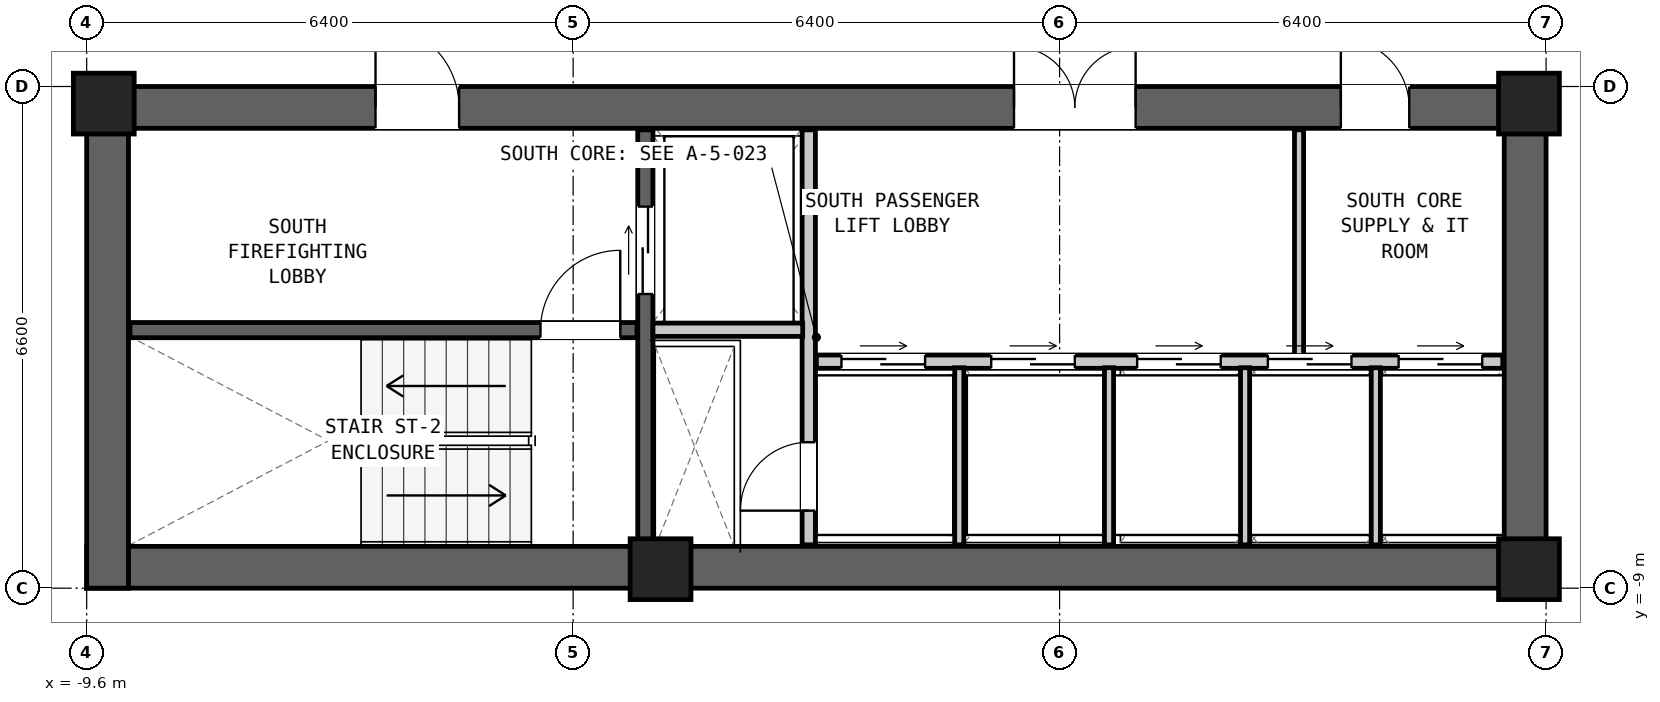
"""IFC4 building model, lengths in metres.
Left out: names, types, materials, properties, quantities, classifications, styles, units other than length and angle.
Written with IfcOpenShell. Run it as: python <this file> out.ifc"""

import sys

from ifc_helpers import new_model, si_unit, direction, frame, frame_2d, origin, origin_2d, place, context, subcontext, project, spatial, rectangle, extrude, element, fill, save


model = new_model("IFC4")
c1 = context("Model", 3, precision=1e-05, world=origin(), true_north=direction((0.0, 1.0)))
c2 = subcontext(c1, "Body", "Model", "MODEL_VIEW")
j1 = project(units=[si_unit("LENGTHUNIT", "METRE"), si_unit("PLANEANGLEUNIT", "RADIAN")], contexts=[c1])
p1 = place(None, origin())
s1 = spatial("IfcSite", under=j1, at=p1, CompositionType="ELEMENT")
p2 = place(p1, origin())
s2 = spatial("IfcBuilding", under=s1, at=p2, CompositionType="ELEMENT")
p3 = place(p2, frame((0.0, 0.0, 72.5)))
s3 = spatial("IfcBuildingStorey", under=s2, at=p3, CompositionType="ELEMENT", Elevation=72.5)
p4 = place(p3, frame((-9.6, -8.725, 0.0), z_axis=(0.0, 0.0, 1.0), x_axis=(1.0, 0.0, 0.0)))
e1 = element("IfcWall", 1, at=p4, inside=s3, PredefinedType="SHEAR", context=c2, shape_type="SweptSolid", body=[
    extrude(rectangle(XDim=19.2, YDim=0.55, at=frame_2d((9.6, 0.0))), origin(), (0.0, 0.0, 1.0), 3.05),
])
p5 = place(p3, frame((-9.6, -2.675, 0.0), z_axis=(0.0, 0.0, 1.0), x_axis=(1.0, 0.0, 0.0)))
e2 = element("IfcWall", 2, at=p5, inside=s3, PredefinedType="SHEAR", context=c2, shape_type="SweptSolid", body=[
    extrude(rectangle(XDim=19.2, YDim=0.55, at=frame_2d((9.6, 0.0))), origin(), (0.0, 0.0, 1.0), 3.05),
])
p6 = place(p5, frame((3.8, 0.0, 0.0)))
e3 = element("IfcOpeningElement", 3, at=p6, cuts=e2, PredefinedType="OPENING", context=c2, shape_type="SweptSolid", body=[
    extrude(rectangle(XDim=1.1, YDim=2.08, at=frame_2d((0.55, 1.04))), frame((0.0, 0.287, 0.0), z_axis=(0.0, -1.0, 0.0), x_axis=(1.0, 0.0, 0.0)), (0.0, 0.0, 1.0), 0.574),
])
p7 = place(p5, frame((12.2, 0.0, 0.0)))
e4 = element("IfcOpeningElement", 4, at=p7, cuts=e2, PredefinedType="OPENING", context=c2, shape_type="SweptSolid", body=[
    extrude(rectangle(XDim=1.6, YDim=2.12, at=frame_2d((0.8, 1.06))), frame((0.0, 0.287, 0.0), z_axis=(0.0, -1.0, 0.0), x_axis=(1.0, 0.0, 0.0)), (0.0, 0.0, 1.0), 0.574),
])
p8 = place(p5, frame((16.5, 0.0, 0.0)))
e5 = element("IfcOpeningElement", 5, at=p8, cuts=e2, PredefinedType="OPENING", context=c2, shape_type="SweptSolid", body=[
    extrude(rectangle(XDim=0.9, YDim=2.05, at=frame_2d((0.45, 1.025))), frame((0.0, 0.287, 0.0), z_axis=(0.0, -1.0, 0.0), x_axis=(1.0, 0.0, 0.0)), (0.0, 0.0, 1.0), 0.574),
])
for number, where, z_axis, x_axis in (
    (6, (-9.325, -9.0, 0.0), (0.0, 0.0, 1.0), (0.0, 1.0, 0.0)),
    (7, (9.325, -9.0, 0.0), (0.0, 0.0, 1.0), (0.0, 1.0, 0.0)),
):
    element("IfcWall", number, at=place(p3, frame(where, z_axis=z_axis, x_axis=x_axis)), inside=s3, PredefinedType="SHEAR", context=c2, shape_type="SweptSolid", body=[
        extrude(rectangle(XDim=6.6, YDim=0.55, at=frame_2d((3.3, 0.0))), origin(), (0.0, 0.0, 1.0), 3.05),
    ])
for number, where, z_axis, x_axis in (
    (8, (-9.375, -2.625, 0.0), (0.0, 0.0, 1.0), (1.0, 0.0, 0.0)),
    (9, (9.375, -2.625, 0.0), (0.0, 0.0, 1.0), (1.0, 0.0, 0.0)),
    (10, (-2.05, -8.75, 0.0), (0.0, 0.0, 1.0), (1.0, 0.0, 0.0)),
    (11, (9.375, -8.75, 0.0), (0.0, 0.0, 1.0), (1.0, 0.0, 0.0)),
):
    element("IfcColumn", number, at=place(p3, frame(where, z_axis=z_axis, x_axis=x_axis)), inside=s3, PredefinedType="COLUMN", context=c2, shape_type="SweptSolid", body=[
        extrude(rectangle(XDim=0.8, YDim=0.8, at=origin_2d()), origin(), (0.0, 0.0, 1.0), 3.05),
    ])
p9 = place(p3, frame((-9.03, -5.605, 0.0), z_axis=(0.0, 0.0, 1.0), x_axis=(1.0, 0.0, 0.0)))
e12 = element("IfcWall", 12, at=p9, inside=s3, PredefinedType="SHEAR", context=c2, shape_type="SweptSolid", body=[
    extrude(rectangle(XDim=6.67, YDim=0.2, at=frame_2d((3.335, 0.0))), origin(), (0.0, 0.0, 1.0), 2.83),
])
p10 = place(p9, frame((5.4, 0.0, 0.0)))
e13 = element("IfcOpeningElement", 13, at=p10, cuts=e12, PredefinedType="OPENING", context=c2, shape_type="SweptSolid", body=[
    extrude(rectangle(XDim=1.05, YDim=2.08, at=frame_2d((0.525, 1.04))), frame((0.0, 0.112, 0.0), z_axis=(0.0, -1.0, 0.0), x_axis=(1.0, 0.0, 0.0)), (0.0, 0.0, 1.0), 0.224),
])
p11 = place(p3, frame((-2.25, -8.43, 0.0), z_axis=(0.0, 0.0, 1.0), x_axis=(0.0, 1.0, 0.0)))
e14 = element("IfcWall", 14, at=p11, inside=s3, PredefinedType="SHEAR", context=c2, shape_type="SweptSolid", body=[
    extrude(rectangle(XDim=5.46, YDim=0.2, at=frame_2d((2.73, 0.0))), origin(), (0.0, 0.0, 1.0), 2.83),
])
p12 = place(p11, frame((3.3, 0.0, 0.0)))
e15 = element("IfcOpeningElement", 15, at=p12, cuts=e14, PredefinedType="OPENING", context=c2, shape_type="SweptSolid", body=[
    extrude(rectangle(XDim=1.15, YDim=2.08, at=frame_2d((0.575, 1.04))), frame((0.0, 0.112, 0.0), z_axis=(0.0, -1.0, 0.0), x_axis=(1.0, 0.0, 0.0)), (0.0, 0.0, 1.0), 0.224),
])
p13 = place(p3, frame((-0.1, -8.43, 0.0), z_axis=(0.0, 0.0, 1.0), x_axis=(0.0, 1.0, 0.0)))
e16 = element("IfcWall", 16, at=p13, inside=s3, PredefinedType="PARTITIONING", context=c2, shape_type="SweptSolid", body=[
    extrude(rectangle(XDim=5.46, YDim=0.175, at=frame_2d((2.73, 0.0))), origin(), (0.0, 0.0, 1.0), 2.83),
])
p14 = place(p13, frame((0.45, 0.0, 0.0)))
e17 = element("IfcOpeningElement", 17, at=p14, cuts=e16, PredefinedType="OPENING", context=c2, shape_type="SweptSolid", body=[
    extrude(rectangle(XDim=0.9, YDim=2.05, at=frame_2d((0.45, 1.025))), frame((0.0, 0.1, 0.0), z_axis=(0.0, -1.0, 0.0), x_axis=(1.0, 0.0, 0.0)), (0.0, 0.0, 1.0), 0.199),
])
p15 = place(p3, frame((-2.15, -5.6, 0.0), z_axis=(0.0, 0.0, 1.0), x_axis=(1.0, 0.0, 0.0)))
e18 = element("IfcWall", 18, at=p15, inside=s3, PredefinedType="PARTITIONING", context=c2, shape_type="SweptSolid", body=[
    extrude(rectangle(XDim=1.97, YDim=0.175, at=frame_2d((0.985, 0.0))), origin(), (0.0, 0.0, 1.0), 2.83),
])
p16 = place(p3, frame((0.0, -6.02, 0.0), z_axis=(0.0, 0.0, 1.0), x_axis=(1.0, 0.0, 0.0)))
e19 = element("IfcWall", 19, at=p16, inside=s3, PredefinedType="PARTITIONING", context=c2, shape_type="SweptSolid", body=[
    extrude(rectangle(XDim=9.03, YDim=0.175, at=frame_2d((4.515, 0.0))), origin(), (0.0, 0.0, 1.0), 2.83),
])
p17 = place(p16, frame((0.33, 0.0, 0.0)))
e20 = element("IfcOpeningElement", 20, at=p17, cuts=e19, PredefinedType="OPENING", context=c2, shape_type="SweptSolid", body=[
    extrude(rectangle(XDim=1.1, YDim=2.06, at=frame_2d((0.55, 1.03))), frame((0.0, 0.1, 0.0), z_axis=(0.0, -1.0, 0.0), x_axis=(1.0, 0.0, 0.0)), (0.0, 0.0, 1.0), 0.199),
])
p18 = place(p16, frame((2.3, 0.0, 0.0)))
e21 = element("IfcOpeningElement", 21, at=p18, cuts=e19, PredefinedType="OPENING", context=c2, shape_type="SweptSolid", body=[
    extrude(rectangle(XDim=1.1, YDim=2.06, at=frame_2d((0.55, 1.03))), frame((0.0, 0.1, 0.0), z_axis=(0.0, -1.0, 0.0), x_axis=(1.0, 0.0, 0.0)), (0.0, 0.0, 1.0), 0.199),
])
p19 = place(p16, frame((4.22, 0.0, 0.0)))
e22 = element("IfcOpeningElement", 22, at=p19, cuts=e19, PredefinedType="OPENING", context=c2, shape_type="SweptSolid", body=[
    extrude(rectangle(XDim=1.1, YDim=2.06, at=frame_2d((0.55, 1.03))), frame((0.0, 0.1, 0.0), z_axis=(0.0, -1.0, 0.0), x_axis=(1.0, 0.0, 0.0)), (0.0, 0.0, 1.0), 0.199),
])
p20 = place(p16, frame((5.94, 0.0, 0.0)))
e23 = element("IfcOpeningElement", 23, at=p20, cuts=e19, PredefinedType="OPENING", context=c2, shape_type="SweptSolid", body=[
    extrude(rectangle(XDim=1.1, YDim=2.06, at=frame_2d((0.55, 1.03))), frame((0.0, 0.1, 0.0), z_axis=(0.0, -1.0, 0.0), x_axis=(1.0, 0.0, 0.0)), (0.0, 0.0, 1.0), 0.199),
])
p21 = place(p16, frame((7.66, 0.0, 0.0)))
e24 = element("IfcOpeningElement", 24, at=p21, cuts=e19, PredefinedType="OPENING", context=c2, shape_type="SweptSolid", body=[
    extrude(rectangle(XDim=1.1, YDim=2.06, at=frame_2d((0.55, 1.03))), frame((0.0, 0.1, 0.0), z_axis=(0.0, -1.0, 0.0), x_axis=(1.0, 0.0, 0.0)), (0.0, 0.0, 1.0), 0.199),
])
for number, where, z_axis, x_axis in (
    (25, (1.88, -8.43, 0.0), (0.0, 0.0, 1.0), (0.0, 1.0, 0.0)),
    (26, (3.85, -8.43, 0.0), (0.0, 0.0, 1.0), (0.0, 1.0, 0.0)),
    (27, (5.64, -8.43, 0.0), (0.0, 0.0, 1.0), (0.0, 1.0, 0.0)),
    (28, (7.36, -8.43, 0.0), (0.0, 0.0, 1.0), (0.0, 1.0, 0.0)),
):
    element("IfcWall", number, at=place(p3, frame(where, z_axis=z_axis, x_axis=x_axis)), inside=s3, PredefinedType="PARTITIONING", context=c2, shape_type="SweptSolid", body=[
        extrude(rectangle(XDim=2.33, YDim=0.12, at=frame_2d((1.165, 0.0))), origin(), (0.0, 0.0, 1.0), 2.83),
    ])
p22 = place(p3, frame((6.35, -5.94, 0.0), z_axis=(0.0, 0.0, 1.0), x_axis=(0.0, 1.0, 0.0)))
e29 = element("IfcWall", 29, at=p22, inside=s3, PredefinedType="PARTITIONING", context=c2, shape_type="SweptSolid", body=[
    extrude(rectangle(XDim=2.97, YDim=0.12, at=frame_2d((1.485, 0.0))), origin(), (0.0, 0.0, 1.0), 2.83),
])
p23 = place(p10, origin())
e30 = element("IfcDoor", 30, at=p23, inside=s3, OperationType="SINGLE_SWING_RIGHT", PredefinedType="DOOR", context=c2, shape_type="SweptSolid", body=[
    extrude(rectangle(XDim=1.05, YDim=2.08, at=frame_2d((0.525, 1.04))), frame((0.0, 0.025, 0.0), z_axis=(0.0, -1.0, 0.0), x_axis=(1.0, 0.0, 0.0)), (0.0, 0.0, 1.0), 0.05),
])
fill(e13, e30)
p24 = place(p6, origin())
e31 = element("IfcDoor", 31, at=p24, inside=s3, OperationType="SINGLE_SWING_LEFT", PredefinedType="DOOR", context=c2, shape_type="SweptSolid", body=[
    extrude(rectangle(XDim=1.1, YDim=2.08, at=frame_2d((0.55, 1.04))), frame((0.0, 0.025, 0.0), z_axis=(0.0, -1.0, 0.0), x_axis=(1.0, 0.0, 0.0)), (0.0, 0.0, 1.0), 0.05),
])
fill(e3, e31)
p25 = place(p12, origin())
e32 = element("IfcDoor", 32, at=p25, inside=s3, OperationType="DOUBLE_DOOR_SLIDING", PredefinedType="DOOR", context=c2, shape_type="SweptSolid", body=[
    extrude(rectangle(XDim=1.15, YDim=2.08, at=frame_2d((0.575, 1.04))), frame((0.0, 0.025, 0.0), z_axis=(0.0, -1.0, 0.0), x_axis=(1.0, 0.0, 0.0)), (0.0, 0.0, 1.0), 0.05),
])
fill(e15, e32)
p26 = place(p14, origin())
e33 = element("IfcDoor", 33, at=p26, inside=s3, OperationType="SINGLE_SWING_LEFT", PredefinedType="DOOR", context=c2, shape_type="SweptSolid", body=[
    extrude(rectangle(XDim=0.9, YDim=2.05, at=frame_2d((0.45, 1.025))), frame((0.0, 0.025, 0.0), z_axis=(0.0, -1.0, 0.0), x_axis=(1.0, 0.0, 0.0)), (0.0, 0.0, 1.0), 0.05),
])
fill(e17, e33)
p27 = place(p7, origin())
e34 = element("IfcDoor", 34, at=p27, inside=s3, OperationType="DOUBLE_DOOR_SINGLE_SWING", PredefinedType="DOOR", context=c2, shape_type="SweptSolid", body=[
    extrude(rectangle(XDim=1.6, YDim=2.12, at=frame_2d((0.8, 1.06))), frame((0.0, 0.025, 0.0), z_axis=(0.0, -1.0, 0.0), x_axis=(1.0, 0.0, 0.0)), (0.0, 0.0, 1.0), 0.05),
])
fill(e4, e34)
p28 = place(p8, origin())
e35 = element("IfcDoor", 35, at=p28, inside=s3, OperationType="SINGLE_SWING_LEFT", PredefinedType="DOOR", context=c2, shape_type="SweptSolid", body=[
    extrude(rectangle(XDim=0.9, YDim=2.05, at=frame_2d((0.45, 1.025))), frame((0.0, 0.025, 0.0), z_axis=(0.0, -1.0, 0.0), x_axis=(1.0, 0.0, 0.0)), (0.0, 0.0, 1.0), 0.05),
])
fill(e5, e35)
p29 = place(p17, origin())
e36 = element("IfcDoor", 36, at=p29, inside=s3, OperationType="DOUBLE_DOOR_SLIDING", PredefinedType="DOOR", context=c2, shape_type="SweptSolid", body=[
    extrude(rectangle(XDim=1.1, YDim=2.06, at=frame_2d((0.55, 1.03))), frame((0.0, 0.025, 0.0), z_axis=(0.0, -1.0, 0.0), x_axis=(1.0, 0.0, 0.0)), (0.0, 0.0, 1.0), 0.05),
])
fill(e20, e36)
p30 = place(p18, origin())
e37 = element("IfcDoor", 37, at=p30, inside=s3, OperationType="DOUBLE_DOOR_SLIDING", PredefinedType="DOOR", context=c2, shape_type="SweptSolid", body=[
    extrude(rectangle(XDim=1.1, YDim=2.06, at=frame_2d((0.55, 1.03))), frame((0.0, 0.025, 0.0), z_axis=(0.0, -1.0, 0.0), x_axis=(1.0, 0.0, 0.0)), (0.0, 0.0, 1.0), 0.05),
])
fill(e21, e37)
p31 = place(p19, origin())
e38 = element("IfcDoor", 38, at=p31, inside=s3, OperationType="DOUBLE_DOOR_SLIDING", PredefinedType="DOOR", context=c2, shape_type="SweptSolid", body=[
    extrude(rectangle(XDim=1.1, YDim=2.06, at=frame_2d((0.55, 1.03))), frame((0.0, 0.025, 0.0), z_axis=(0.0, -1.0, 0.0), x_axis=(1.0, 0.0, 0.0)), (0.0, 0.0, 1.0), 0.05),
])
fill(e22, e38)
p32 = place(p20, origin())
e39 = element("IfcDoor", 39, at=p32, inside=s3, OperationType="DOUBLE_DOOR_SLIDING", PredefinedType="DOOR", context=c2, shape_type="SweptSolid", body=[
    extrude(rectangle(XDim=1.1, YDim=2.06, at=frame_2d((0.55, 1.03))), frame((0.0, 0.025, 0.0), z_axis=(0.0, -1.0, 0.0), x_axis=(1.0, 0.0, 0.0)), (0.0, 0.0, 1.0), 0.05),
])
fill(e23, e39)
p33 = place(p21, origin())
e40 = element("IfcDoor", 40, at=p33, inside=s3, OperationType="DOUBLE_DOOR_SLIDING", PredefinedType="DOOR", context=c2, shape_type="SweptSolid", body=[
    extrude(rectangle(XDim=1.1, YDim=2.06, at=frame_2d((0.55, 1.03))), frame((0.0, 0.025, 0.0), z_axis=(0.0, -1.0, 0.0), x_axis=(1.0, 0.0, 0.0)), (0.0, 0.0, 1.0), 0.05),
])
fill(e24, e40)
save(model, sys.argv[1])
